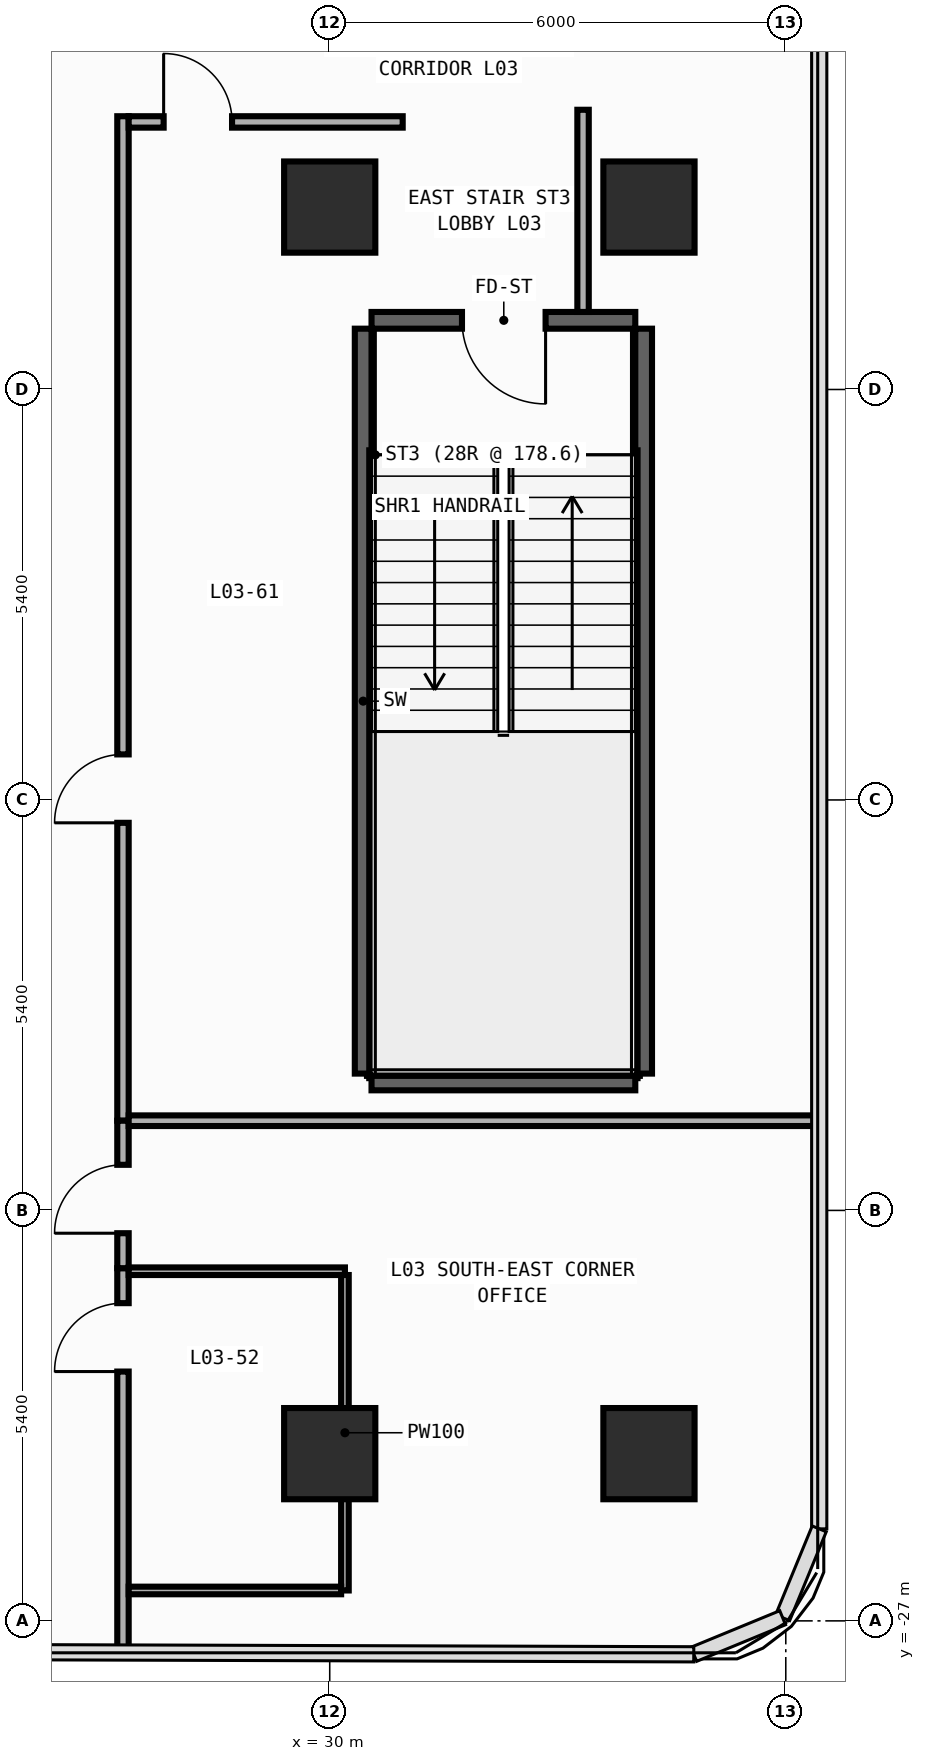
"""IFC4 building model, lengths in metres.
Left out: names, types, materials, properties, quantities, classifications, styles, units other than length and angle.
Written with IfcOpenShell. Run it as: python <this file> out.ifc"""

import sys

from ifc_helpers import new_model, si_unit, direction, frame, frame_2d, origin, origin_2d, place, context, subcontext, project, spatial, rectangle, extrude, element, fill, save


model = new_model("IFC4")
c1 = context("Model", 3, precision=1e-05, world=origin(), true_north=direction((0.0, 1.0)))
c2 = subcontext(c1, "Body", "Model", "MODEL_VIEW")
j1 = project(units=[si_unit("LENGTHUNIT", "METRE"), si_unit("PLANEANGLEUNIT", "RADIAN")], contexts=[c1])
p1 = place(None, origin())
s1 = spatial("IfcSite", under=j1, at=p1, CompositionType="ELEMENT")
p2 = place(p1, origin())
s2 = spatial("IfcBuilding", under=s1, at=p2, CompositionType="ELEMENT")
p3 = place(p2, frame((0.0, 0.0, 11.0)))
s3 = spatial("IfcBuildingStorey", under=s2, at=p3, CompositionType="ELEMENT", Elevation=11.0)
p4 = place(p3, frame((34.02, -9.89, 0.0), z_axis=(0.0, 0.0, 1.0), x_axis=(-1.0, 0.0, 0.0)))
e1 = element("IfcWall", 1, at=p4, inside=s3, PredefinedType="SHEAR", context=c2, shape_type="SweptSolid", body=[
    extrude(rectangle(XDim=3.47, YDim=0.22, at=frame_2d((1.735, 0.0))), origin(), (0.0, 0.0, 1.0), 4.7),
])
p5 = place(p4, frame((1.18, 0.0, 0.0)))
e2 = element("IfcOpeningElement", 2, at=p5, cuts=e1, PredefinedType="OPENING", context=c2, shape_type="SweptSolid", body=[
    extrude(rectangle(XDim=1.1, YDim=2.2, at=frame_2d((0.55, 1.1))), frame((0.0, 0.12, 0.0), z_axis=(0.0, -1.0, 0.0), x_axis=(1.0, 0.0, 0.0)), (0.0, 0.0, 1.0), 0.24),
])
p6 = place(p3, frame((30.55, -19.91, 0.0), z_axis=(0.0, 0.0, 1.0), x_axis=(1.0, 0.0, 0.0)))
e3 = element("IfcWall", 3, at=p6, inside=s3, PredefinedType="SHEAR", context=c2, shape_type="SweptSolid", body=[
    extrude(rectangle(XDim=3.47, YDim=0.22, at=frame_2d((1.735, 0.0))), origin(), (0.0, 0.0, 1.0), 4.7),
])
for number, where, z_axis, x_axis in (
    (4, (30.44, -19.8, 0.0), (0.0, 0.0, 1.0), (0.0, 1.0, 0.0)),
    (5, (34.13, -19.8, 0.0), (0.0, 0.0, 1.0), (0.0, 1.0, 0.0)),
):
    element("IfcWall", number, at=place(p3, frame(where, z_axis=z_axis, x_axis=x_axis)), inside=s3, PredefinedType="SHEAR", context=c2, shape_type="SweptSolid", body=[
        extrude(rectangle(XDim=9.8, YDim=0.22, at=frame_2d((4.9, 0.0))), origin(), (0.0, 0.0, 1.0), 4.7),
    ])
for number, where, z_axis, x_axis in (
    (6, (30.0, -24.8, 0.0), (0.0, 0.0, 1.0), (1.0, 0.0, 0.0)),
    (7, (30.0, -8.4, 0.0), (0.0, 0.0, 1.0), (1.0, 0.0, 0.0)),
    (8, (34.2, -24.8, 0.0), (0.0, 0.0, 1.0), (1.0, 0.0, 0.0)),
    (9, (34.2, -8.4, 0.0), (0.0, 0.0, 1.0), (1.0, 0.0, 0.0)),
):
    element("IfcColumn", number, at=place(p3, frame(where, z_axis=z_axis, x_axis=x_axis)), inside=s3, PredefinedType="COLUMN", context=c2, shape_type="SweptSolid", body=[
        extrude(rectangle(XDim=1.2, YDim=1.2, at=origin_2d()), origin(), (0.0, 0.0, 1.0), 5.0),
    ])
p7 = place(p3, frame((27.28, -27.421, 0.0), z_axis=(0.0, 0.0, 1.0), x_axis=(0.0, 1.0, 0.0)))
e10 = element("IfcWall", 10, at=p7, inside=s3, PredefinedType="PARTITIONING", context=c2, shape_type="SweptSolid", body=[
    extrude(rectangle(XDim=5.061, YDim=0.15, at=frame_2d((2.531, 0.0))), origin(), (0.0, 0.0, 1.0), 4.7),
])
p8 = place(p7, frame((3.701, 0.0, 0.0)))
e11 = element("IfcOpeningElement", 11, at=p8, cuts=e10, PredefinedType="OPENING", context=c2, shape_type="SweptSolid", body=[
    extrude(rectangle(XDim=0.9, YDim=2.15, at=frame_2d((0.45, 1.075))), frame((0.0, 0.085, 0.0), z_axis=(0.0, -1.0, 0.0), x_axis=(1.0, 0.0, 0.0)), (0.0, 0.0, 1.0), 0.17),
])
p9 = place(p3, frame((27.28, -20.42, 0.0), z_axis=(0.0, 0.0, 1.0), x_axis=(0.0, 1.0, 0.0)))
e12 = element("IfcWall", 12, at=p9, inside=s3, PredefinedType="PARTITIONING", context=c2, shape_type="SweptSolid", body=[
    extrude(rectangle(XDim=13.215, YDim=0.15, at=frame_2d((6.607, 0.0))), origin(), (0.0, 0.0, 1.0), 4.7),
])
p10 = place(p9, frame((3.919, 0.0, 0.0)))
e13 = element("IfcOpeningElement", 13, at=p10, cuts=e12, PredefinedType="OPENING", context=c2, shape_type="SweptSolid", body=[
    extrude(rectangle(XDim=0.9, YDim=2.15, at=frame_2d((0.45, 1.075))), frame((0.0, 0.085, 0.0), z_axis=(0.0, -1.0, 0.0), x_axis=(1.0, 0.0, 0.0)), (0.0, 0.0, 1.0), 0.17),
])
p11 = place(p3, frame((27.28, -22.36, 0.0), z_axis=(0.0, 0.0, 1.0), x_axis=(0.0, 1.0, 0.0)))
e14 = element("IfcWall", 14, at=p11, inside=s3, PredefinedType="PARTITIONING", context=c2, shape_type="SweptSolid", body=[
    extrude(rectangle(XDim=1.94, YDim=0.15, at=frame_2d((0.97, 0.0))), origin(), (0.0, 0.0, 1.0), 4.7),
])
p12 = place(p11, frame((0.46, 0.0, 0.0)))
e15 = element("IfcOpeningElement", 15, at=p12, cuts=e14, PredefinedType="OPENING", context=c2, shape_type="SweptSolid", body=[
    extrude(rectangle(XDim=0.9, YDim=2.15, at=frame_2d((0.45, 1.075))), frame((0.0, 0.085, 0.0), z_axis=(0.0, -1.0, 0.0), x_axis=(1.0, 0.0, 0.0)), (0.0, 0.0, 1.0), 0.17),
])
p13 = place(p3, frame((27.355, -7.28, 0.0), z_axis=(0.0, 0.0, 1.0), x_axis=(1.0, 0.0, 0.0)))
e16 = element("IfcWall", 16, at=p13, inside=s3, PredefinedType="PARTITIONING", context=c2, shape_type="SweptSolid", body=[
    extrude(rectangle(XDim=3.605, YDim=0.15, at=frame_2d((1.802, 0.0))), origin(), (0.0, 0.0, 1.0), 4.7),
])
p14 = place(p13, frame((0.46, 0.0, 0.0)))
e17 = element("IfcOpeningElement", 17, at=p14, cuts=e16, PredefinedType="OPENING", context=c2, shape_type="SweptSolid", body=[
    extrude(rectangle(XDim=0.9, YDim=2.15, at=frame_2d((0.45, 1.075))), frame((0.0, 0.085, 0.0), z_axis=(0.0, -1.0, 0.0), x_axis=(1.0, 0.0, 0.0)), (0.0, 0.0, 1.0), 0.17),
])
p15 = place(p3, frame((33.333, -9.78, 0.0), z_axis=(0.0, 0.0, 1.0), x_axis=(0.0, 1.0, 0.0)))
e18 = element("IfcWall", 18, at=p15, inside=s3, PredefinedType="PARTITIONING", context=c2, shape_type="SweptSolid", body=[
    extrude(rectangle(XDim=2.66, YDim=0.15, at=frame_2d((1.33, 0.0))), origin(), (0.0, 0.0, 1.0), 4.7),
])
p16 = place(p3, frame((27.355, -20.42, 0.0), z_axis=(0.0, 0.0, 1.0), x_axis=(1.0, 0.0, 0.0)))
e19 = element("IfcWall", 19, at=p16, inside=s3, PredefinedType="PARTITIONING", context=c2, shape_type="SweptSolid", body=[
    extrude(rectangle(XDim=9.09, YDim=0.14, at=frame_2d((4.545, 0.0))), origin(), (0.0, 0.0, 1.0), 4.7),
])
p17 = place(p3, frame((27.355, -22.4, 0.0), z_axis=(0.0, 0.0, 1.0), x_axis=(1.0, 0.0, 0.0)))
e20 = element("IfcWall", 20, at=p17, inside=s3, PredefinedType="PARTITIONING", context=c2, shape_type="SweptSolid", body=[
    extrude(rectangle(XDim=2.845, YDim=0.1, at=frame_2d((1.422, 0.0))), origin(), (0.0, 0.0, 1.0), 4.7),
])
p18 = place(p3, frame((30.2, -22.45, 0.0), z_axis=(0.0, 0.0, 1.0), x_axis=(0.0, -1.0, 0.0)))
e21 = element("IfcWall", 21, at=p18, inside=s3, PredefinedType="PARTITIONING", context=c2, shape_type="SweptSolid", body=[
    extrude(rectangle(XDim=4.15, YDim=0.1, at=frame_2d((2.075, 0.0))), origin(), (0.0, 0.0, 1.0), 4.7),
])
p19 = place(p3, frame((30.15, -26.6, 0.0), z_axis=(0.0, 0.0, 1.0), x_axis=(-1.0, 0.0, 0.0)))
e22 = element("IfcWall", 22, at=p19, inside=s3, PredefinedType="PARTITIONING", context=c2, shape_type="SweptSolid", body=[
    extrude(rectangle(XDim=2.795, YDim=0.1, at=frame_2d((1.397, 0.0))), origin(), (0.0, 0.0, 1.0), 4.7),
])
p20 = place(p5, origin())
e23 = element("IfcDoor", 23, at=p20, inside=s3, OperationType="SINGLE_SWING_LEFT", PredefinedType="DOOR", context=c2, shape_type="SweptSolid", body=[
    extrude(rectangle(XDim=1.1, YDim=2.2, at=frame_2d((0.55, 1.1))), frame((0.0, 0.025, 0.0), z_axis=(0.0, -1.0, 0.0), x_axis=(1.0, 0.0, 0.0)), (0.0, 0.0, 1.0), 0.05),
])
fill(e2, e23)
p21 = place(p8, origin())
e24 = element("IfcDoor", 24, at=p21, inside=s3, OperationType="SINGLE_SWING_LEFT", PredefinedType="DOOR", context=c2, shape_type="SweptSolid", body=[
    extrude(rectangle(XDim=0.9, YDim=2.15, at=frame_2d((0.45, 1.075))), frame((0.0, 0.025, 0.0), z_axis=(0.0, -1.0, 0.0), x_axis=(1.0, 0.0, 0.0)), (0.0, 0.0, 1.0), 0.05),
])
fill(e11, e24)
p22 = place(p10, origin())
e25 = element("IfcDoor", 25, at=p22, inside=s3, OperationType="SINGLE_SWING_LEFT", PredefinedType="DOOR", context=c2, shape_type="SweptSolid", body=[
    extrude(rectangle(XDim=0.9, YDim=2.15, at=frame_2d((0.45, 1.075))), frame((0.0, 0.025, 0.0), z_axis=(0.0, -1.0, 0.0), x_axis=(1.0, 0.0, 0.0)), (0.0, 0.0, 1.0), 0.05),
])
fill(e13, e25)
p23 = place(p12, origin())
e26 = element("IfcDoor", 26, at=p23, inside=s3, OperationType="SINGLE_SWING_LEFT", PredefinedType="DOOR", context=c2, shape_type="SweptSolid", body=[
    extrude(rectangle(XDim=0.9, YDim=2.15, at=frame_2d((0.45, 1.075))), frame((0.0, 0.025, 0.0), z_axis=(0.0, -1.0, 0.0), x_axis=(1.0, 0.0, 0.0)), (0.0, 0.0, 1.0), 0.05),
])
fill(e15, e26)
p24 = place(p14, origin())
e27 = element("IfcDoor", 27, at=p24, inside=s3, OperationType="SINGLE_SWING_LEFT", PredefinedType="DOOR", context=c2, shape_type="SweptSolid", body=[
    extrude(rectangle(XDim=0.9, YDim=2.15, at=frame_2d((0.45, 1.075))), frame((0.0, 0.025, 0.0), z_axis=(0.0, -1.0, 0.0), x_axis=(1.0, 0.0, 0.0)), (0.0, 0.0, 1.0), 0.05),
])
fill(e17, e27)
save(model, sys.argv[1])
